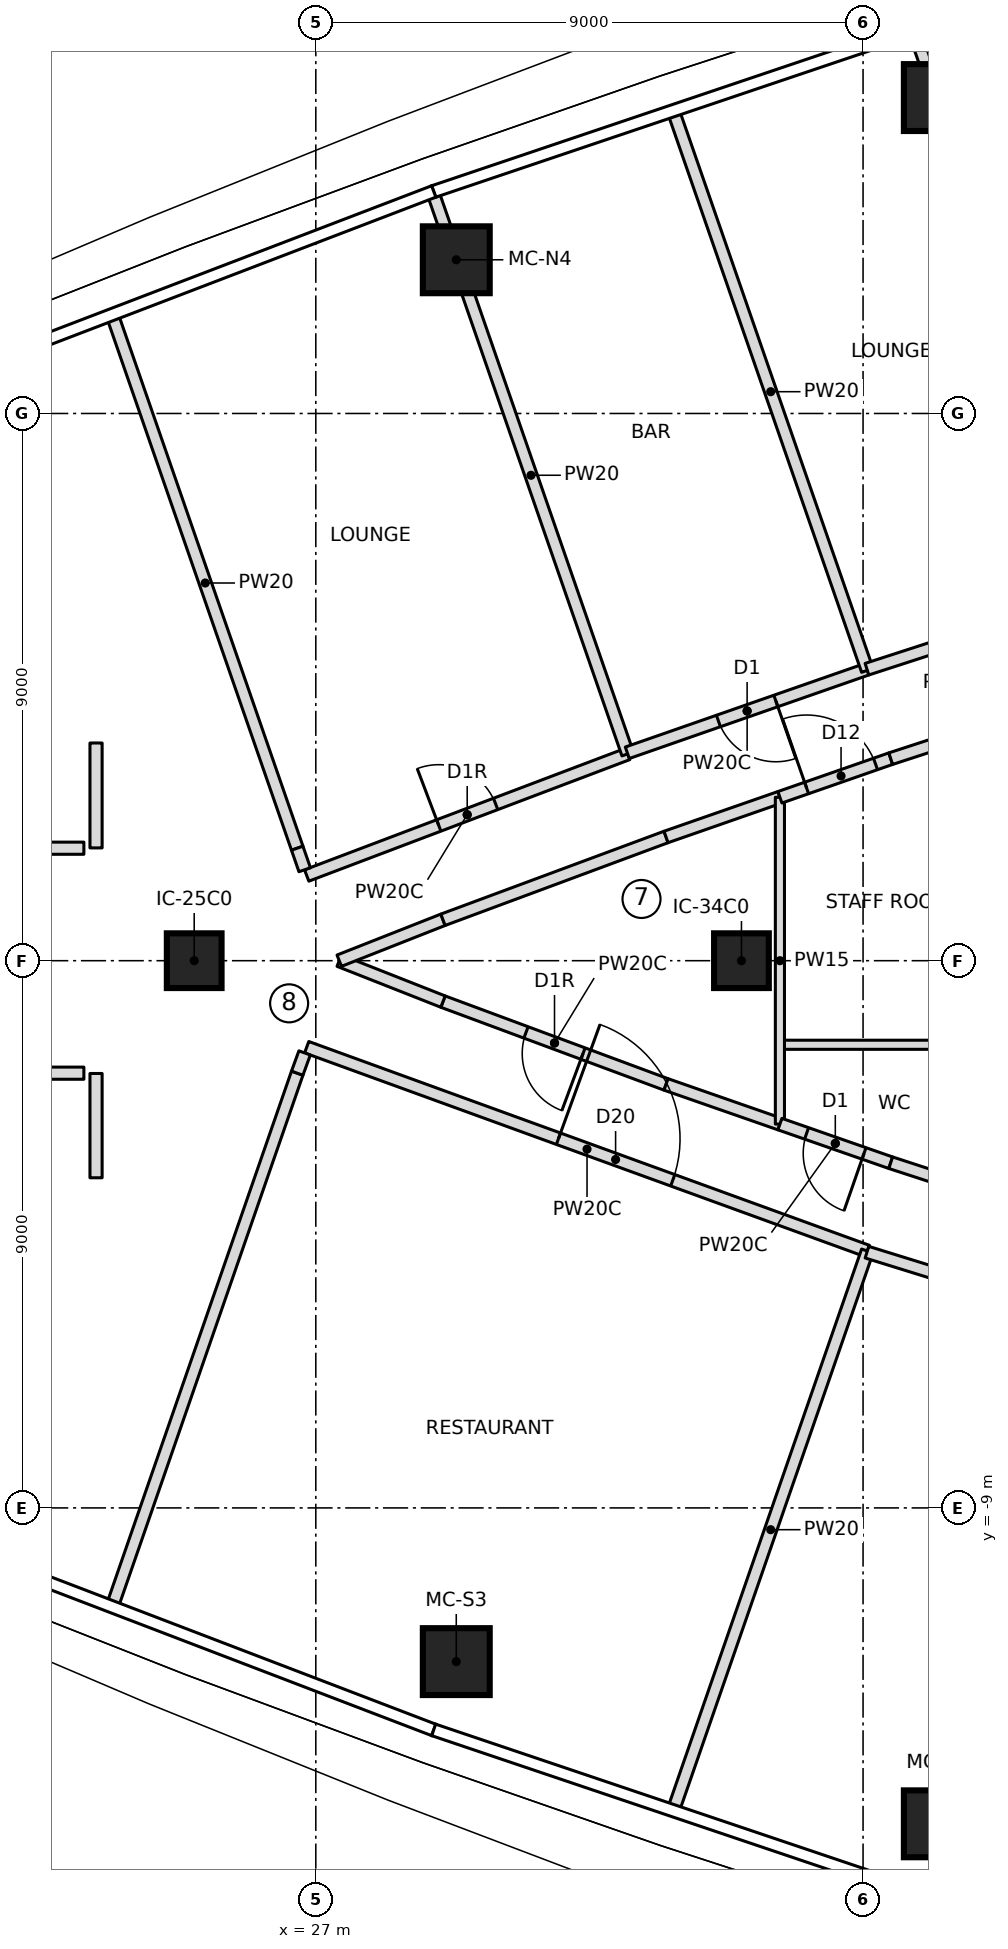
"""IFC4 building model, lengths in metres.
Left out: names, types, materials, properties, quantities, classifications, styles, units other than length and angle.
Written with IfcOpenShell. Run it as: python <this file> out.ifc"""

import sys

from ifc_helpers import new_model, si_unit, direction, frame, frame_2d, origin, origin_2d, place, context, subcontext, project, spatial, rectangle, extrude, element, fill, save


model = new_model("IFC4")
c1 = context("Model", 3, precision=1e-05, world=origin(), true_north=direction((0.0, 1.0)))
c2 = subcontext(c1, "Body", "Model", "MODEL_VIEW")
j1 = project(units=[si_unit("LENGTHUNIT", "METRE"), si_unit("PLANEANGLEUNIT", "RADIAN")], contexts=[c1])
p1 = place(None, origin())
s1 = spatial("IfcSite", under=j1, at=p1, CompositionType="ELEMENT")
p2 = place(p1, origin())
s2 = spatial("IfcBuilding", under=s1, at=p2, CompositionType="ELEMENT")
p3 = place(p2, frame((0.0, 0.0, 263.3)))
s3 = spatial("IfcBuildingStorey", under=s2, at=p3, CompositionType="ELEMENT", Elevation=263.3)
for number, where, z_axis, x_axis in (
    (1, (29.31, -11.528, 0.0), (0.0, 0.0, 1.0), (1.0, 0.0, 0.0)),
    (2, (37.221, -14.196, 0.0), (0.0, 0.0, 1.0), (1.0, 0.0, 0.0)),
    (3, (37.221, 14.196, 0.0), (0.0, 0.0, 1.0), (1.0, 0.0, 0.0)),
    (4, (29.31, 11.528, 0.0), (0.0, 0.0, 1.0), (1.0, 0.0, 0.0)),
):
    element("IfcColumn", number, at=place(p3, frame(where, z_axis=z_axis, x_axis=x_axis)), inside=s3, PredefinedType="COLUMN", context=c2, shape_type="SweptSolid", body=[
        extrude(rectangle(XDim=1.1, YDim=1.1, at=origin_2d()), origin(), (0.0, 0.0, 1.0), 4.6),
    ])
for number, where, z_axis, x_axis in (
    (5, (25.0, 0.0, 0.0), (0.0, 0.0, 1.0), (1.0, 0.0, 0.0)),
    (6, (34.0, 0.0, 0.0), (0.0, 0.0, 1.0), (1.0, 0.0, 0.0)),
):
    element("IfcColumn", number, at=place(p3, frame(where, z_axis=z_axis, x_axis=x_axis)), inside=s3, PredefinedType="COLUMN", context=c2, shape_type="SweptSolid", body=[
        extrude(rectangle(XDim=0.9, YDim=0.9, at=origin_2d()), origin(), (0.0, 0.0, 1.0), 4.6),
    ])
p4 = place(p3, frame((13.637, 1.85, 0.0), z_axis=(0.0, 0.0, 1.0), x_axis=(1.0, 0.0, 0.0)))
e7 = element("IfcWall", 7, at=p4, inside=s3, PredefinedType="PARTITIONING", context=c2, shape_type="SweptSolid", body=[
    extrude(rectangle(XDim=9.549, YDim=0.2, at=frame_2d((4.774, 0.0))), origin(), (0.0, 0.0, 1.0), 4.3),
])
p5 = place(p4, frame((4.274, 0.0, 0.0)))
e8 = element("IfcOpeningElement", 8, at=p5, cuts=e7, PredefinedType="OPENING", context=c2, shape_type="SweptSolid", body=[
    extrude(rectangle(XDim=1.0, YDim=2.1, at=frame_2d((0.5, 1.05))), frame((0.0, 0.11, 0.0), z_axis=(0.0, -1.0, 0.0), x_axis=(1.0, 0.0, 0.0)), (0.0, 0.0, 1.0), 0.22),
])
p6 = place(p3, frame((13.637, -1.85, 0.0), z_axis=(0.0, 0.0, 1.0), x_axis=(1.0, 0.0, 0.0)))
e9 = element("IfcWall", 9, at=p6, inside=s3, PredefinedType="PARTITIONING", context=c2, shape_type="SweptSolid", body=[
    extrude(rectangle(XDim=9.549, YDim=0.2, at=frame_2d((4.774, 0.0))), origin(), (0.0, 0.0, 1.0), 4.3),
])
p7 = place(p6, frame((4.274, 0.0, 0.0)))
e10 = element("IfcOpeningElement", 10, at=p7, cuts=e9, PredefinedType="OPENING", context=c2, shape_type="SweptSolid", body=[
    extrude(rectangle(XDim=1.0, YDim=2.1, at=frame_2d((0.5, 1.05))), frame((0.0, 0.11, 0.0), z_axis=(0.0, -1.0, 0.0), x_axis=(1.0, 0.0, 0.0)), (0.0, 0.0, 1.0), 0.22),
])
p8 = place(p3, frame((26.694, 1.85, 0.0), z_axis=(0.0, 0.0, 1.0), x_axis=(-0.327714422317, 0.944776829418, 0.0)))
e11 = element("IfcWall", 11, at=p8, inside=s3, PredefinedType="PARTITIONING", context=c2, shape_type="SweptSolid", body=[
    extrude(rectangle(XDim=9.233, YDim=0.2, at=frame_2d((4.617, 0.0))), origin(), (0.0, 0.0, 1.0), 4.3),
])
p9 = place(p3, frame((26.85, 1.401, 0.0), z_axis=(0.0, 0.0, 1.0), x_axis=(0.935181367748, 0.354169181912, 0.0)))
e12 = element("IfcWall", 12, at=p9, inside=s3, PredefinedType="PARTITIONING", context=c2, shape_type="SweptSolid", body=[
    extrude(rectangle(XDim=5.645, YDim=0.2, at=frame_2d((2.823, 0.0))), origin(), (0.0, 0.0, 1.0), 4.3),
])
p10 = place(p9, frame((2.323, 0.0, 0.0)))
e13 = element("IfcOpeningElement", 13, at=p10, cuts=e12, PredefinedType="OPENING", context=c2, shape_type="SweptSolid", body=[
    extrude(rectangle(XDim=1.0, YDim=2.1, at=frame_2d((0.5, 1.05))), frame((0.0, 0.11, 0.0), z_axis=(0.0, -1.0, 0.0), x_axis=(1.0, 0.0, 0.0)), (0.0, 0.0, 1.0), 0.22),
])
p11 = place(p3, frame((32.129, 3.401, 0.0), z_axis=(0.0, 0.0, 1.0), x_axis=(-0.327724115377, 0.944773467134, 0.0)))
e14 = element("IfcWall", 14, at=p11, inside=s3, PredefinedType="PARTITIONING", context=c2, shape_type="SweptSolid", body=[
    extrude(rectangle(XDim=9.702, YDim=0.2, at=frame_2d((4.851, 0.0))), origin(), (0.0, 0.0, 1.0), 4.3),
])
p12 = place(p3, frame((36.064, 4.794, 0.0), z_axis=(0.0, 0.0, 1.0), x_axis=(-0.944236129554, -0.329269086986, 0.0)))
e15 = element("IfcWall", 15, at=p12, inside=s3, PredefinedType="PARTITIONING", context=c2, shape_type="SweptSolid", body=[
    extrude(rectangle(XDim=4.174, YDim=0.2, at=frame_2d((2.087, 0.0))), origin(), (0.0, 0.0, 1.0), 4.3),
])
p13 = place(p12, frame((1.587, 0.0, 0.0)))
e16 = element("IfcOpeningElement", 16, at=p13, cuts=e15, PredefinedType="OPENING", context=c2, shape_type="SweptSolid", body=[
    extrude(rectangle(XDim=1.0, YDim=2.1, at=frame_2d((0.5, 1.05))), frame((0.0, 0.11, 0.0), z_axis=(0.0, -1.0, 0.0), x_axis=(1.0, 0.0, 0.0)), (0.0, 0.0, 1.0), 0.22),
])
p14 = place(p3, frame((36.071, 4.775, 0.0), z_axis=(0.0, 0.0, 1.0), x_axis=(-0.327725028322, 0.94477315045, 0.0)))
e17 = element("IfcWall", 17, at=p14, inside=s3, PredefinedType="PARTITIONING", context=c2, shape_type="SweptSolid", body=[
    extrude(rectangle(XDim=9.702, YDim=0.2, at=frame_2d((4.851, 0.0))), origin(), (0.0, 0.0, 1.0), 4.3),
])
p15 = place(p3, frame((40.035, 6.083, 0.0), z_axis=(0.0, 0.0, 1.0), x_axis=(-0.951196378796, -0.308586209941, 0.0)))
e18 = element("IfcWall", 18, at=p15, inside=s3, PredefinedType="PARTITIONING", context=c2, shape_type="SweptSolid", body=[
    extrude(rectangle(XDim=4.175, YDim=0.2, at=frame_2d((2.087, 0.0))), origin(), (0.0, 0.0, 1.0), 4.3),
])
p16 = place(p15, frame((1.588, 0.0, 0.0)))
e19 = element("IfcOpeningElement", 19, at=p16, cuts=e18, PredefinedType="OPENING", context=c2, shape_type="SweptSolid", body=[
    extrude(rectangle(XDim=1.0, YDim=2.1, at=frame_2d((0.5, 1.05))), frame((0.0, 0.11, 0.0), z_axis=(0.0, -1.0, 0.0), x_axis=(1.0, 0.0, 0.0)), (0.0, 0.0, 1.0), 0.22),
])
p17 = place(p3, frame((40.042, 6.064, 0.0), z_axis=(0.0, 0.0, 1.0), x_axis=(-0.327710853631, 0.944778067279, 0.0)))
e20 = element("IfcWall", 20, at=p17, inside=s3, PredefinedType="PARTITIONING", context=c2, shape_type="SweptSolid", body=[
    extrude(rectangle(XDim=9.707, YDim=0.2, at=frame_2d((4.854, 0.0))), origin(), (0.0, 0.0, 1.0), 4.3),
])
p18 = place(p3, frame((23.668, -10.573, 0.0), z_axis=(0.0, 0.0, 1.0), x_axis=(0.327714422317, 0.944776829418, 0.0)))
e21 = element("IfcWall", 21, at=p18, inside=s3, PredefinedType="PARTITIONING", context=c2, shape_type="SweptSolid", body=[
    extrude(rectangle(XDim=9.233, YDim=0.2, at=frame_2d((4.617, 0.0))), origin(), (0.0, 0.0, 1.0), 4.3),
])
p19 = place(p3, frame((26.85, -1.423, 0.0), z_axis=(0.0, 0.0, 1.0), x_axis=(0.939807953272, -0.341703103536, 0.0)))
e22 = element("IfcWall", 22, at=p19, inside=s3, PredefinedType="PARTITIONING", context=c2, shape_type="SweptSolid", body=[
    extrude(rectangle(XDim=9.811, YDim=0.2, at=frame_2d((4.906, 0.0))), origin(), (0.0, 0.0, 1.0), 4.3),
])
p20 = place(p19, frame((4.406, 0.0, 0.0)))
e23 = element("IfcOpeningElement", 23, at=p20, cuts=e22, PredefinedType="OPENING", context=c2, shape_type="SweptSolid", body=[
    extrude(rectangle(XDim=2.0, YDim=2.4, at=frame_2d((1.0, 1.2))), frame((0.0, 0.11, 0.0), z_axis=(0.0, -1.0, 0.0), x_axis=(1.0, 0.0, 0.0)), (0.0, 0.0, 1.0), 0.22),
])
p21 = place(p3, frame((32.891, -13.941, 0.0), z_axis=(0.0, 0.0, 1.0), x_axis=(0.327725028322, 0.94477315045, 0.0)))
e24 = element("IfcWall", 24, at=p21, inside=s3, PredefinedType="PARTITIONING", context=c2, shape_type="SweptSolid", body=[
    extrude(rectangle(XDim=9.702, YDim=0.2, at=frame_2d((4.851, 0.0))), origin(), (0.0, 0.0, 1.0), 4.3),
])
p22 = place(p3, frame((36.064, -4.794, 0.0), z_axis=(0.0, 0.0, 1.0), x_axis=(0.955129200503, -0.296189483855, 0.0)))
e25 = element("IfcWall", 25, at=p22, inside=s3, PredefinedType="PARTITIONING", context=c2, shape_type="SweptSolid", body=[
    extrude(rectangle(XDim=8.348, YDim=0.2, at=frame_2d((4.174, 0.0))), origin(), (0.0, 0.0, 1.0), 4.3),
])
p23 = place(p22, frame((3.674, 0.0, 0.0)))
e26 = element("IfcOpeningElement", 26, at=p23, cuts=e25, PredefinedType="OPENING", context=c2, shape_type="SweptSolid", body=[
    extrude(rectangle(XDim=2.0, YDim=2.4, at=frame_2d((1.0, 1.2))), frame((0.0, 0.11, 0.0), z_axis=(0.0, -1.0, 0.0), x_axis=(1.0, 0.0, 0.0)), (0.0, 0.0, 1.0), 0.22),
])
p24 = place(p3, frame((32.76, -2.035, 0.0), z_axis=(0.0, 0.0, 1.0), x_axis=(-0.937460178932, 0.348092534992, 0.0)))
e27 = element("IfcWall", 27, at=p24, inside=s3, PredefinedType="PARTITIONING", context=c2, shape_type="SweptSolid", body=[
    extrude(rectangle(XDim=3.913, YDim=0.2, at=frame_2d((1.957, 0.0))), origin(), (0.0, 0.0, 1.0), 4.3),
])
p25 = place(p24, frame((1.457, 0.0, 0.0)))
e28 = element("IfcOpeningElement", 28, at=p25, cuts=e27, PredefinedType="OPENING", context=c2, shape_type="SweptSolid", body=[
    extrude(rectangle(XDim=1.0, YDim=2.1, at=frame_2d((0.5, 1.05))), frame((0.0, 0.11, 0.0), z_axis=(0.0, -1.0, 0.0), x_axis=(1.0, 0.0, 0.0)), (0.0, 0.0, 1.0), 0.22),
])
for number, where, z_axis, x_axis in (
    (29, (29.092, -0.673, 0.0), (0.0, 0.0, 1.0), (-0.93, 0.367, 0.0)),
    (30, (27.385, 0.0, 0.0), (0.0, 0.0, 1.0), (0.93, 0.367, 0.0)),
):
    element("IfcWall", number, at=place(p3, frame(where, z_axis=z_axis, x_axis=x_axis)), inside=s3, PredefinedType="PARTITIONING", context=c2, shape_type="SweptSolid", body=[
        extrude(rectangle(XDim=1.834, YDim=0.2, at=frame_2d((0.917, 0.0))), origin(), (0.0, 0.0, 1.0), 4.3),
    ])
p26 = place(p3, frame((29.092, 0.673, 0.0), z_axis=(0.0, 0.0, 1.0), x_axis=(0.937460178932, 0.348092534992, 0.0)))
e31 = element("IfcWall", 31, at=p26, inside=s3, PredefinedType="PARTITIONING", context=c2, shape_type="SweptSolid", body=[
    extrude(rectangle(XDim=3.913, YDim=0.2, at=frame_2d((1.957, 0.0))), origin(), (0.0, 0.0, 1.0), 4.3),
])
for number, where, z_axis, x_axis in (
    (32, (32.76, 2.035, 0.0), (0.0, 0.0, 1.0), (0.944, 0.329, 0.0)),
    (33, (34.632, -2.688, 0.0), (0.0, 0.0, 1.0), (-0.944, 0.329, 0.0)),
):
    element("IfcWall", number, at=place(p3, frame(where, z_axis=z_axis, x_axis=x_axis)), inside=s3, PredefinedType="PARTITIONING", context=c2, shape_type="SweptSolid", body=[
        extrude(rectangle(XDim=1.983, YDim=0.2, at=frame_2d((0.991, 0.0))), origin(), (0.0, 0.0, 1.0), 4.3),
    ])
p27 = place(p3, frame((34.632, -1.383, 0.0), z_axis=(0.0, 0.0, 1.0), x_axis=(1.0, 0.0, 0.0)))
e34 = element("IfcWall", 34, at=p27, inside=s3, PredefinedType="PARTITIONING", context=c2, shape_type="SweptSolid", body=[
    extrude(rectangle(XDim=3.41, YDim=0.15, at=frame_2d((1.705, 0.0))), origin(), (0.0, 0.0, 1.0), 4.3),
])
p28 = place(p3, frame((34.632, -2.688, 0.0), z_axis=(0.0, 0.0, 1.0), x_axis=(0.0, 1.0, 0.0)))
e35 = element("IfcWall", 35, at=p28, inside=s3, PredefinedType="PARTITIONING", context=c2, shape_type="SweptSolid", body=[
    extrude(rectangle(XDim=5.375, YDim=0.15, at=frame_2d((2.688, 0.0))), origin(), (0.0, 0.0, 1.0), 4.3),
])
p29 = place(p3, frame((36.455, -3.323, 0.0), z_axis=(0.0, 0.0, 1.0), x_axis=(-0.944267869157, 0.329178054066, 0.0)))
e36 = element("IfcWall", 36, at=p29, inside=s3, PredefinedType="PARTITIONING", context=c2, shape_type="SweptSolid", body=[
    extrude(rectangle(XDim=1.93, YDim=0.2, at=frame_2d((0.965, 0.0))), origin(), (0.0, 0.0, 1.0), 4.3),
])
p30 = place(p29, frame((0.465, 0.0, 0.0)))
e37 = element("IfcOpeningElement", 37, at=p30, cuts=e36, PredefinedType="OPENING", context=c2, shape_type="SweptSolid", body=[
    extrude(rectangle(XDim=1.0, YDim=2.1, at=frame_2d((0.5, 1.05))), frame((0.0, 0.11, 0.0), z_axis=(0.0, -1.0, 0.0), x_axis=(1.0, 0.0, 0.0)), (0.0, 0.0, 1.0), 0.22),
])
p31 = place(p3, frame((38.043, -3.841, 0.0), z_axis=(0.0, 0.0, 1.0), x_axis=(-0.950695184954, 0.31012685357, 0.0)))
e38 = element("IfcWall", 38, at=p31, inside=s3, PredefinedType="PARTITIONING", context=c2, shape_type="SweptSolid", body=[
    extrude(rectangle(XDim=1.67, YDim=0.2, at=frame_2d((0.835, 0.0))), origin(), (0.0, 0.0, 1.0), 4.3),
])
p32 = place(p3, frame((34.632, 2.688, 0.0), z_axis=(0.0, 0.0, 1.0), x_axis=(0.944267869157, 0.329178054066, 0.0)))
e39 = element("IfcWall", 39, at=p32, inside=s3, PredefinedType="PARTITIONING", context=c2, shape_type="SweptSolid", body=[
    extrude(rectangle(XDim=1.93, YDim=0.2, at=frame_2d((0.965, 0.0))), origin(), (0.0, 0.0, 1.0), 4.3),
])
p33 = place(p32, frame((0.465, 0.0, 0.0)))
e40 = element("IfcOpeningElement", 40, at=p33, cuts=e39, PredefinedType="OPENING", context=c2, shape_type="SweptSolid", body=[
    extrude(rectangle(XDim=1.2, YDim=2.1, at=frame_2d((0.6, 1.05))), frame((0.0, 0.11, 0.0), z_axis=(0.0, -1.0, 0.0), x_axis=(1.0, 0.0, 0.0)), (0.0, 0.0, 1.0), 0.22),
])
p34 = place(p3, frame((36.455, 3.323, 0.0), z_axis=(0.0, 0.0, 1.0), x_axis=(0.950695184954, 0.31012685357, 0.0)))
e41 = element("IfcWall", 41, at=p34, inside=s3, PredefinedType="PARTITIONING", context=c2, shape_type="SweptSolid", body=[
    extrude(rectangle(XDim=1.67, YDim=0.2, at=frame_2d((0.835, 0.0))), origin(), (0.0, 0.0, 1.0), 4.3),
])
p35 = place(p3, frame((23.386, 3.58, 0.0), z_axis=(0.0, 0.0, 1.0), x_axis=(0.0, -1.0, 0.0)))
e42 = element("IfcWall", 42, at=p35, inside=s3, PredefinedType="PARTITIONING", context=c2, shape_type="SweptSolid", body=[
    extrude(rectangle(XDim=1.725, YDim=0.2, at=frame_2d((0.863, 0.0))), origin(), (0.0, 0.0, 1.0), 4.3),
])
p36 = place(p3, frame((23.386, -1.855, 0.0), z_axis=(0.0, 0.0, 1.0), x_axis=(0.0, -1.0, 0.0)))
e43 = element("IfcWall", 43, at=p36, inside=s3, PredefinedType="PARTITIONING", context=c2, shape_type="SweptSolid", body=[
    extrude(rectangle(XDim=1.715, YDim=0.2, at=frame_2d((0.858, 0.0))), origin(), (0.0, 0.0, 1.0), 4.3),
])
p37 = place(p3, frame((26.817, 1.496, 0.0), z_axis=(0.0, 0.0, 1.0), x_axis=(-0.327535464747, 0.944838885384, 0.0)))
e44 = element("IfcWall", 44, at=p37, inside=s3, PredefinedType="PARTITIONING", context=c2, shape_type="SweptSolid", body=[
    extrude(rectangle(XDim=0.375, YDim=0.2, at=frame_2d((0.188, 0.0))), origin(), (0.0, 0.0, 1.0), 4.3),
])
p38 = place(p3, frame((26.694, -1.85, 0.0), z_axis=(0.0, 0.0, 1.0), x_axis=(0.342737536943, 0.939431200658, 0.0)))
e45 = element("IfcWall", 45, at=p38, inside=s3, PredefinedType="PARTITIONING", context=c2, shape_type="SweptSolid", body=[
    extrude(rectangle(XDim=0.355, YDim=0.2, at=frame_2d((0.177, 0.0))), origin(), (0.0, 0.0, 1.0), 4.3),
])
p39 = place(p10, origin())
e46 = element("IfcDoor", 46, at=p39, inside=s3, OperationType="SINGLE_SWING_RIGHT", PredefinedType="DOOR", context=c2, shape_type="SweptSolid", body=[
    extrude(rectangle(XDim=1.0, YDim=2.1, at=frame_2d((0.5, 1.05))), frame((0.0, 0.025, 0.0), z_axis=(0.0, -1.0, 0.0), x_axis=(1.0, 0.0, 0.0)), (0.0, 0.0, 1.0), 0.05),
])
fill(e13, e46)
p40 = place(p13, origin())
e47 = element("IfcDoor", 47, at=p40, inside=s3, OperationType="SINGLE_SWING_LEFT", PredefinedType="DOOR", context=c2, shape_type="SweptSolid", body=[
    extrude(rectangle(XDim=1.0, YDim=2.1, at=frame_2d((0.5, 1.05))), frame((0.0, 0.025, 0.0), z_axis=(0.0, -1.0, 0.0), x_axis=(1.0, 0.0, 0.0)), (0.0, 0.0, 1.0), 0.05),
])
fill(e16, e47)
p41 = place(p20, origin())
e48 = element("IfcDoor", 48, at=p41, inside=s3, OperationType="DOUBLE_DOOR_SINGLE_SWING", PredefinedType="DOOR", context=c2, shape_type="SweptSolid", body=[
    extrude(rectangle(XDim=2.0, YDim=2.4, at=frame_2d((1.0, 1.2))), frame((0.0, 0.025, 0.0), z_axis=(0.0, -1.0, 0.0), x_axis=(1.0, 0.0, 0.0)), (0.0, 0.0, 1.0), 0.05),
])
fill(e23, e48)
p42 = place(p25, origin())
e49 = element("IfcDoor", 49, at=p42, inside=s3, OperationType="SINGLE_SWING_RIGHT", PredefinedType="DOOR", context=c2, shape_type="SweptSolid", body=[
    extrude(rectangle(XDim=1.0, YDim=2.1, at=frame_2d((0.5, 1.05))), frame((0.0, 0.025, 0.0), z_axis=(0.0, -1.0, 0.0), x_axis=(1.0, 0.0, 0.0)), (0.0, 0.0, 1.0), 0.05),
])
fill(e28, e49)
p43 = place(p30, origin())
e50 = element("IfcDoor", 50, at=p43, inside=s3, OperationType="SINGLE_SWING_LEFT", PredefinedType="DOOR", context=c2, shape_type="SweptSolid", body=[
    extrude(rectangle(XDim=1.0, YDim=2.1, at=frame_2d((0.5, 1.05))), frame((0.0, 0.025, 0.0), z_axis=(0.0, -1.0, 0.0), x_axis=(1.0, 0.0, 0.0)), (0.0, 0.0, 1.0), 0.05),
])
fill(e37, e50)
p44 = place(p33, origin())
e51 = element("IfcDoor", 51, at=p44, inside=s3, OperationType="SINGLE_SWING_RIGHT", PredefinedType="DOOR", context=c2, shape_type="SweptSolid", body=[
    extrude(rectangle(XDim=1.2, YDim=2.1, at=frame_2d((0.6, 1.05))), frame((0.0, 0.025, 0.0), z_axis=(0.0, -1.0, 0.0), x_axis=(1.0, 0.0, 0.0)), (0.0, 0.0, 1.0), 0.05),
])
fill(e40, e51)
save(model, sys.argv[1])
